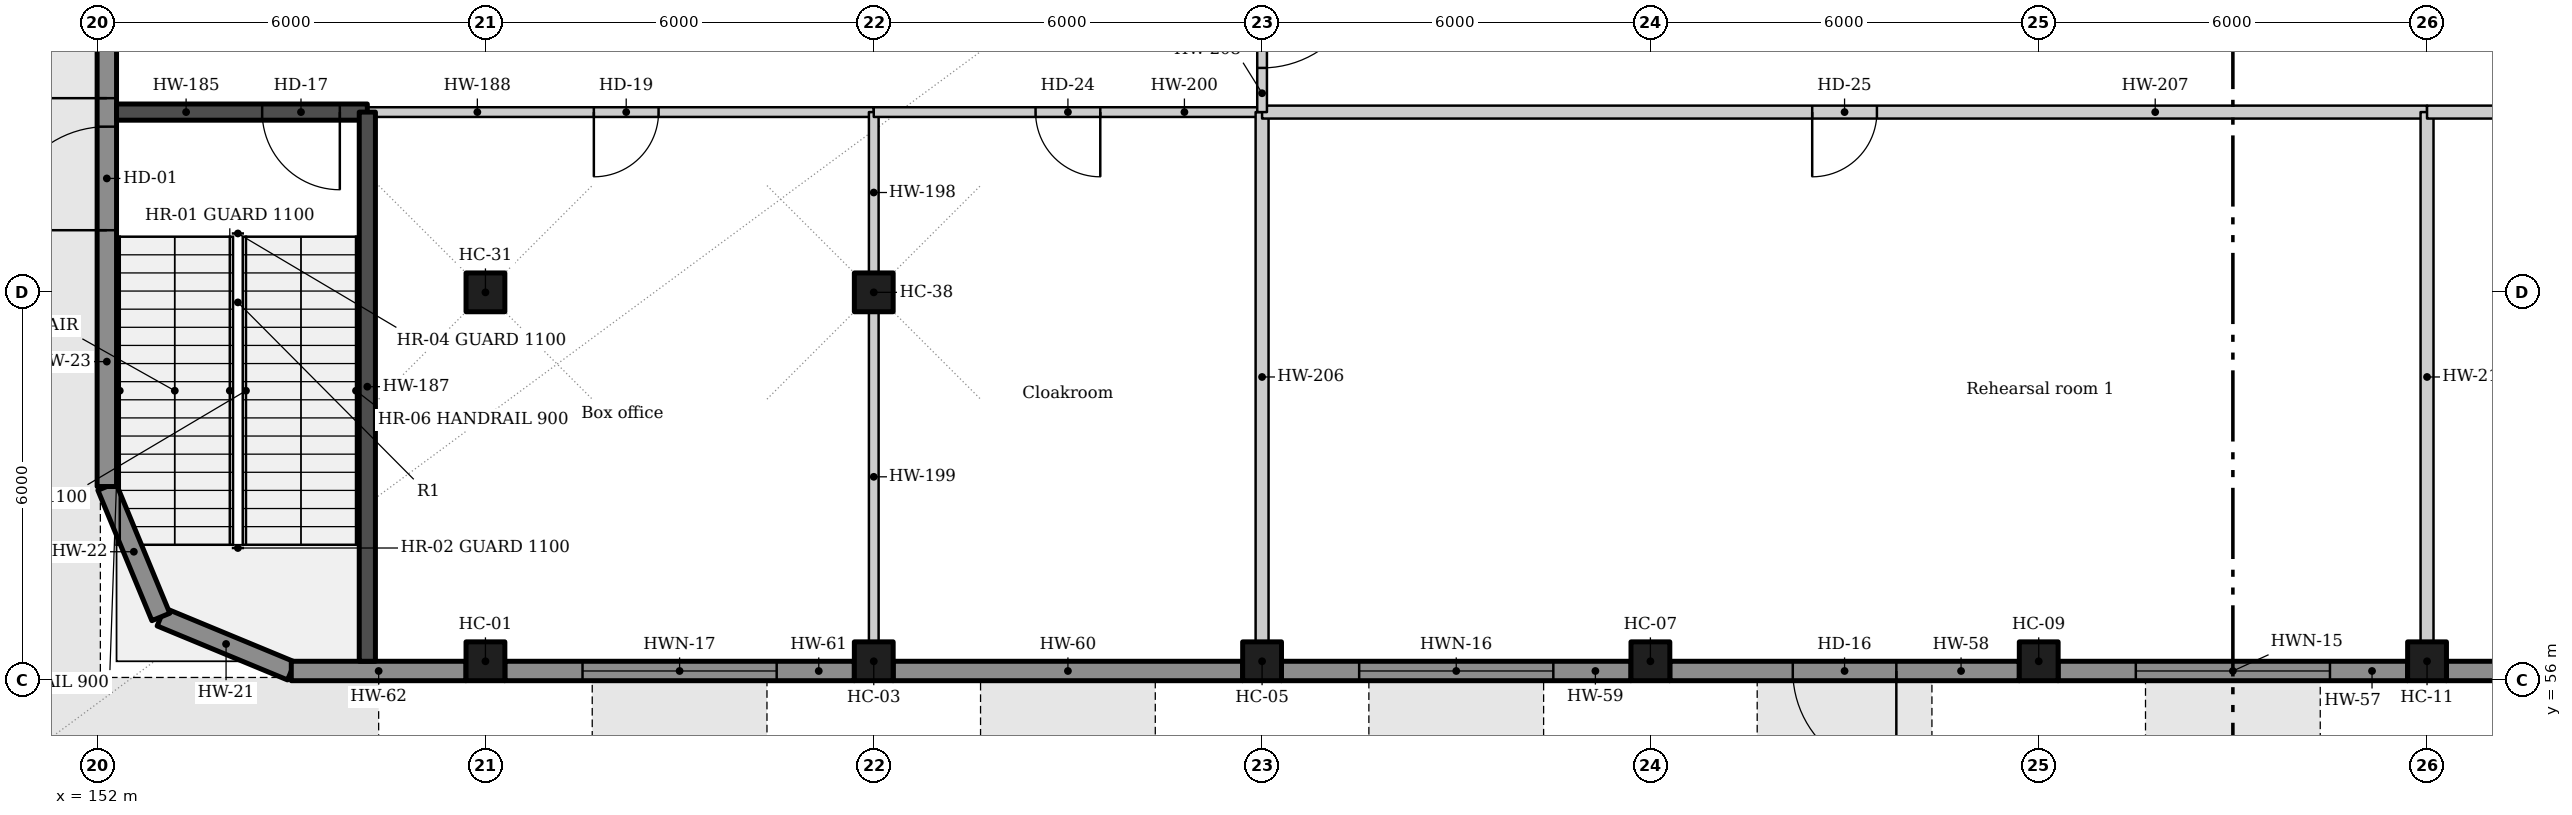
"""IFC4 building model, lengths in metres.
Left out: names, types, materials, properties, quantities, classifications, styles, units other than length and angle.
Written with IfcOpenShell. Run it as: python <this file> out.ifc"""

import sys

from ifc_helpers import new_model, si_unit, direction, frame, frame_2d, origin, origin_2d, place, context, subcontext, project, spatial, rectangle, extrude, element, fill, save


model = new_model("IFC4")
c1 = context("Model", 3, precision=1e-05, world=origin(), true_north=direction((0.0, 1.0)))
c2 = subcontext(c1, "Body", "Model", "MODEL_VIEW")
j1 = project(units=[si_unit("LENGTHUNIT", "METRE"), si_unit("PLANEANGLEUNIT", "RADIAN")], contexts=[c1])
p1 = place(None, origin())
s1 = spatial("IfcSite", under=j1, at=p1, CompositionType="ELEMENT")
p2 = place(p1, origin())
s2 = spatial("IfcBuilding", under=s1, at=p2, CompositionType="ELEMENT")
p3 = place(p2, origin())
s3 = spatial("IfcBuildingStorey", under=s2, at=p3, CompositionType="ELEMENT", Elevation=0.0)
for number, where, z_axis, x_axis in (
    (1, (158.0, 56.3, 0.0), (0.0, 0.0, 1.0), (1.0, 0.0, 0.0)),
    (2, (164.0, 56.3, 0.0), (0.0, 0.0, 1.0), (1.0, 0.0, 0.0)),
    (3, (170.0, 56.3, 0.0), (0.0, 0.0, 1.0), (1.0, 0.0, 0.0)),
    (4, (176.0, 56.3, 0.0), (0.0, 0.0, 1.0), (1.0, 0.0, 0.0)),
    (5, (182.0, 56.3, 0.0), (0.0, 0.0, 1.0), (1.0, 0.0, 0.0)),
    (6, (188.0, 56.3, 0.0), (0.0, 0.0, 1.0), (1.0, 0.0, 0.0)),
    (7, (158.0, 62.0, 0.0), (0.0, 0.0, 1.0), (1.0, 0.0, 0.0)),
    (8, (164.0, 62.0, 0.0), (0.0, 0.0, 1.0), (1.0, 0.0, 0.0)),
):
    element("IfcColumn", number, at=place(p3, frame(where, z_axis=z_axis, x_axis=x_axis)), inside=s3, PredefinedType="COLUMN", context=c2, shape_type="SweptSolid", body=[
        extrude(rectangle(XDim=0.6, YDim=0.6, at=origin_2d()), origin(), (0.0, 0.0, 1.0), 6.6),
    ])
for number, where, z_axis, x_axis in (
    (9, (155.0, 56.15, 0.0), (0.0, 0.0, 1.0), (-0.924, 0.383, 0.0)),
    (10, (152.985, 56.985, 0.0), (0.0, 0.0, 1.0), (-0.383, 0.924, 0.0)),
):
    element("IfcWall", number, at=place(p3, frame(where, z_axis=z_axis, x_axis=x_axis)), inside=s3, PredefinedType="SOLIDWALL", context=c2, shape_type="SweptSolid", body=[
        extrude(rectangle(XDim=2.181, YDim=0.3, at=frame_2d((1.091, 0.0))), origin(), (0.0, 0.0, 1.0), 6.6),
    ])
p4 = place(p3, frame((152.15, 59.0, 0.0), z_axis=(0.0, 0.0, 1.0), x_axis=(0.0, 1.0, 0.0)))
e11 = element("IfcWall", 11, at=p4, inside=s3, PredefinedType="SOLIDWALL", context=c2, shape_type="SweptSolid", body=[
    extrude(rectangle(XDim=8.7, YDim=0.3, at=frame_2d((4.35, 0.0))), origin(), (0.0, 0.0, 1.0), 6.6),
])
p5 = place(p4, frame((3.96, 0.0, 0.0)))
e12 = element("IfcOpeningElement", 12, at=p5, cuts=e11, PredefinedType="OPENING", context=c2, shape_type="SweptSolid", body=[
    extrude(rectangle(XDim=1.6, YDim=2.4, at=frame_2d((0.8, 1.2))), frame((0.0, 0.16, 0.0), z_axis=(0.0, -1.0, 0.0), x_axis=(1.0, 0.0, 0.0)), (0.0, 0.0, 1.0), 0.32),
])
p6 = place(p4, frame((6.0, 0.0, 0.0)))
e13 = element("IfcOpeningElement", 13, at=p6, cuts=e11, PredefinedType="OPENING", context=c2, shape_type="SweptSolid", body=[
    extrude(rectangle(XDim=2.4, YDim=2.5, at=frame_2d((1.2, 1.25))), frame((0.0, 0.16, 0.0), z_axis=(0.0, -1.0, 0.0), x_axis=(1.0, 0.0, 0.0)), (0.0, 0.0, 1.0), 0.32),
])
p7 = place(p3, frame((193.7, 56.15, 0.0), z_axis=(0.0, 0.0, 1.0), x_axis=(-1.0, 0.0, 0.0)))
e14 = element("IfcWall", 14, at=p7, inside=s3, PredefinedType="SOLIDWALL", context=c2, shape_type="SweptSolid", body=[
    extrude(rectangle(XDim=5.4, YDim=0.3, at=frame_2d((2.7, 0.0))), origin(), (0.0, 0.0, 1.0), 6.6),
])
p8 = place(p7, frame((1.2, 0.0, 0.9)))
e15 = element("IfcOpeningElement", 15, at=p8, cuts=e14, PredefinedType="OPENING", context=c2, shape_type="SweptSolid", body=[
    extrude(rectangle(XDim=3.0, YDim=1.8, at=frame_2d((1.5, 0.9))), frame((0.0, 0.16, 0.0), z_axis=(0.0, -1.0, 0.0), x_axis=(1.0, 0.0, 0.0)), (0.0, 0.0, 1.0), 0.32),
])
p9 = place(p3, frame((187.7, 56.15, 0.0), z_axis=(0.0, 0.0, 1.0), x_axis=(-1.0, 0.0, 0.0)))
e16 = element("IfcWall", 16, at=p9, inside=s3, PredefinedType="SOLIDWALL", context=c2, shape_type="SweptSolid", body=[
    extrude(rectangle(XDim=5.4, YDim=0.3, at=frame_2d((2.7, 0.0))), origin(), (0.0, 0.0, 1.0), 6.6),
])
p10 = place(p9, frame((1.2, 0.0, 0.9)))
e17 = element("IfcOpeningElement", 17, at=p10, cuts=e16, PredefinedType="OPENING", context=c2, shape_type="SweptSolid", body=[
    extrude(rectangle(XDim=3.0, YDim=1.8, at=frame_2d((1.5, 0.9))), frame((0.0, 0.16, 0.0), z_axis=(0.0, -1.0, 0.0), x_axis=(1.0, 0.0, 0.0)), (0.0, 0.0, 1.0), 0.32),
])
p11 = place(p3, frame((181.7, 56.15, 0.0), z_axis=(0.0, 0.0, 1.0), x_axis=(-1.0, 0.0, 0.0)))
e18 = element("IfcWall", 18, at=p11, inside=s3, PredefinedType="SOLIDWALL", context=c2, shape_type="SweptSolid", body=[
    extrude(rectangle(XDim=5.4, YDim=0.3, at=frame_2d((2.7, 0.0))), origin(), (0.0, 0.0, 1.0), 6.6),
])
p12 = place(p11, frame((1.9, 0.0, 0.0)))
e19 = element("IfcOpeningElement", 19, at=p12, cuts=e18, PredefinedType="OPENING", context=c2, shape_type="SweptSolid", body=[
    extrude(rectangle(XDim=1.6, YDim=2.4, at=frame_2d((0.8, 1.2))), frame((0.0, 0.16, 0.0), z_axis=(0.0, -1.0, 0.0), x_axis=(1.0, 0.0, 0.0)), (0.0, 0.0, 1.0), 0.32),
])
p13 = place(p3, frame((175.7, 56.15, 0.0), z_axis=(0.0, 0.0, 1.0), x_axis=(-1.0, 0.0, 0.0)))
e20 = element("IfcWall", 20, at=p13, inside=s3, PredefinedType="SOLIDWALL", context=c2, shape_type="SweptSolid", body=[
    extrude(rectangle(XDim=5.4, YDim=0.3, at=frame_2d((2.7, 0.0))), origin(), (0.0, 0.0, 1.0), 6.6),
])
p14 = place(p13, frame((1.2, 0.0, 0.9)))
e21 = element("IfcOpeningElement", 21, at=p14, cuts=e20, PredefinedType="OPENING", context=c2, shape_type="SweptSolid", body=[
    extrude(rectangle(XDim=3.0, YDim=1.8, at=frame_2d((1.5, 0.9))), frame((0.0, 0.16, 0.0), z_axis=(0.0, -1.0, 0.0), x_axis=(1.0, 0.0, 0.0)), (0.0, 0.0, 1.0), 0.32),
])
p15 = place(p3, frame((169.7, 56.15, 0.0), z_axis=(0.0, 0.0, 1.0), x_axis=(-1.0, 0.0, 0.0)))
e22 = element("IfcWall", 22, at=p15, inside=s3, PredefinedType="SOLIDWALL", context=c2, shape_type="SweptSolid", body=[
    extrude(rectangle(XDim=5.4, YDim=0.3, at=frame_2d((2.7, 0.0))), origin(), (0.0, 0.0, 1.0), 6.6),
])
p16 = place(p3, frame((163.7, 56.15, 0.0), z_axis=(0.0, 0.0, 1.0), x_axis=(-1.0, 0.0, 0.0)))
e23 = element("IfcWall", 23, at=p16, inside=s3, PredefinedType="SOLIDWALL", context=c2, shape_type="SweptSolid", body=[
    extrude(rectangle(XDim=5.4, YDim=0.3, at=frame_2d((2.7, 0.0))), origin(), (0.0, 0.0, 1.0), 6.6),
])
p17 = place(p16, frame((1.2, 0.0, 0.9)))
e24 = element("IfcOpeningElement", 24, at=p17, cuts=e23, PredefinedType="OPENING", context=c2, shape_type="SweptSolid", body=[
    extrude(rectangle(XDim=3.0, YDim=1.8, at=frame_2d((1.5, 0.9))), frame((0.0, 0.16, 0.0), z_axis=(0.0, -1.0, 0.0), x_axis=(1.0, 0.0, 0.0)), (0.0, 0.0, 1.0), 0.32),
])
p18 = place(p3, frame((157.7, 56.15, 0.0), z_axis=(0.0, 0.0, 1.0), x_axis=(-1.0, 0.0, 0.0)))
e25 = element("IfcWall", 25, at=p18, inside=s3, PredefinedType="SOLIDWALL", context=c2, shape_type="SweptSolid", body=[
    extrude(rectangle(XDim=2.7, YDim=0.3, at=frame_2d((1.35, 0.0))), origin(), (0.0, 0.0, 1.0), 6.6),
])
p19 = place(p3, frame((156.175, 64.785, 0.0), z_axis=(0.0, 0.0, 1.0), x_axis=(-1.0, 0.0, 0.0)))
e26 = element("IfcWall", 26, at=p19, inside=s3, PredefinedType="SOLIDWALL", context=c2, shape_type="SweptSolid", body=[
    extrude(rectangle(XDim=3.875, YDim=0.25, at=frame_2d((1.938, 0.0))), origin(), (0.0, 0.0, 1.0), 6.6),
])
p20 = place(p19, frame((0.425, 0.0, 0.0)))
e27 = element("IfcOpeningElement", 27, at=p20, cuts=e26, PredefinedType="OPENING", context=c2, shape_type="SweptSolid", body=[
    extrude(rectangle(XDim=1.2, YDim=2.1, at=frame_2d((0.6, 1.05))), frame((0.0, 0.135, 0.0), z_axis=(0.0, -1.0, 0.0), x_axis=(1.0, 0.0, 0.0)), (0.0, 0.0, 1.0), 0.27),
])
p21 = place(p3, frame((156.175, 64.785, 0.0), z_axis=(0.0, 0.0, 1.0), x_axis=(0.0, -1.0, 0.0)))
e28 = element("IfcWall", 28, at=p21, inside=s3, PredefinedType="SOLIDWALL", context=c2, shape_type="SweptSolid", body=[
    extrude(rectangle(XDim=8.485, YDim=0.25, at=frame_2d((4.242, 0.0))), origin(), (0.0, 0.0, 1.0), 6.6),
])
p22 = place(p3, frame((164.0, 64.785, 0.0), z_axis=(0.0, 0.0, 1.0), x_axis=(-1.0, 0.0, 0.0)))
e29 = element("IfcWall", 29, at=p22, inside=s3, PredefinedType="PARTITIONING", context=c2, shape_type="SweptSolid", body=[
    extrude(rectangle(XDim=7.825, YDim=0.15, at=frame_2d((3.913, 0.0))), origin(), (0.0, 0.0, 1.0), 6.25),
])
p23 = place(p22, frame((3.325, 0.0, 0.0)))
e30 = element("IfcOpeningElement", 30, at=p23, cuts=e29, PredefinedType="OPENING", context=c2, shape_type="SweptSolid", body=[
    extrude(rectangle(XDim=1.0, YDim=2.1, at=frame_2d((0.5, 1.05))), frame((0.0, 0.085, 0.0), z_axis=(0.0, -1.0, 0.0), x_axis=(1.0, 0.0, 0.0)), (0.0, 0.0, 1.0), 0.17),
])
p24 = place(p3, frame((164.0, 64.785, 0.0), z_axis=(0.0, 0.0, 1.0), x_axis=(0.0, -1.0, 0.0)))
e31 = element("IfcWall", 31, at=p24, inside=s3, PredefinedType="PARTITIONING", context=c2, shape_type="SweptSolid", body=[
    extrude(rectangle(XDim=2.485, YDim=0.15, at=frame_2d((1.242, 0.0))), origin(), (0.0, 0.0, 1.0), 6.25),
])
p25 = place(p3, frame((164.0, 61.7, 0.0), z_axis=(0.0, 0.0, 1.0), x_axis=(0.0, -1.0, 0.0)))
e32 = element("IfcWall", 32, at=p25, inside=s3, PredefinedType="PARTITIONING", context=c2, shape_type="SweptSolid", body=[
    extrude(rectangle(XDim=5.1, YDim=0.15, at=frame_2d((2.55, 0.0))), origin(), (0.0, 0.0, 1.0), 6.25),
])
p26 = place(p3, frame((170.0, 64.785, 0.0), z_axis=(0.0, 0.0, 1.0), x_axis=(-1.0, 0.0, 0.0)))
e33 = element("IfcWall", 33, at=p26, inside=s3, PredefinedType="PARTITIONING", context=c2, shape_type="SweptSolid", body=[
    extrude(rectangle(XDim=6.0, YDim=0.15, at=frame_2d((3.0, 0.0))), origin(), (0.0, 0.0, 1.0), 6.25),
])
p27 = place(p26, frame((2.5, 0.0, 0.0)))
e34 = element("IfcOpeningElement", 34, at=p27, cuts=e33, PredefinedType="OPENING", context=c2, shape_type="SweptSolid", body=[
    extrude(rectangle(XDim=1.0, YDim=2.1, at=frame_2d((0.5, 1.05))), frame((0.0, 0.085, 0.0), z_axis=(0.0, -1.0, 0.0), x_axis=(1.0, 0.0, 0.0)), (0.0, 0.0, 1.0), 0.17),
])
p28 = place(p3, frame((170.0, 64.785, 0.0), z_axis=(0.0, 0.0, 1.0), x_axis=(0.0, -1.0, 0.0)))
e35 = element("IfcWall", 35, at=p28, inside=s3, PredefinedType="PARTITIONING", context=c2, shape_type="SweptSolid", body=[
    extrude(rectangle(XDim=8.185, YDim=0.2, at=frame_2d((4.092, 0.0))), origin(), (0.0, 0.0, 1.0), 6.25),
])
p29 = place(p3, frame((188.0, 64.785, 0.0), z_axis=(0.0, 0.0, 1.0), x_axis=(-1.0, 0.0, 0.0)))
e36 = element("IfcWall", 36, at=p29, inside=s3, PredefinedType="PARTITIONING", context=c2, shape_type="SweptSolid", body=[
    extrude(rectangle(XDim=18.0, YDim=0.2, at=frame_2d((9.0, 0.0))), origin(), (0.0, 0.0, 1.0), 6.25),
])
p30 = place(p29, frame((8.5, 0.0, 0.0)))
e37 = element("IfcOpeningElement", 37, at=p30, cuts=e36, PredefinedType="OPENING", context=c2, shape_type="SweptSolid", body=[
    extrude(rectangle(XDim=1.0, YDim=2.1, at=frame_2d((0.5, 1.05))), frame((0.0, 0.11, 0.0), z_axis=(0.0, -1.0, 0.0), x_axis=(1.0, 0.0, 0.0)), (0.0, 0.0, 1.0), 0.22),
])
p31 = place(p3, frame((170.0, 67.75, 0.0), z_axis=(0.0, 0.0, 1.0), x_axis=(0.0, -1.0, 0.0)))
e38 = element("IfcWall", 38, at=p31, inside=s3, PredefinedType="PARTITIONING", context=c2, shape_type="SweptSolid", body=[
    extrude(rectangle(XDim=2.965, YDim=0.15, at=frame_2d((1.482, 0.0))), origin(), (0.0, 0.0, 1.0), 6.25),
])
p32 = place(p31, frame((0.683, 0.0, 0.0)))
e39 = element("IfcOpeningElement", 39, at=p32, cuts=e38, PredefinedType="OPENING", context=c2, shape_type="SweptSolid", body=[
    extrude(rectangle(XDim=1.6, YDim=2.1, at=frame_2d((0.8, 1.05))), frame((0.0, 0.085, 0.0), z_axis=(0.0, -1.0, 0.0), x_axis=(1.0, 0.0, 0.0)), (0.0, 0.0, 1.0), 0.17),
])
p33 = place(p3, frame((188.0, 64.785, 0.0), z_axis=(0.0, 0.0, 1.0), x_axis=(0.0, -1.0, 0.0)))
e40 = element("IfcWall", 40, at=p33, inside=s3, PredefinedType="PARTITIONING", context=c2, shape_type="SweptSolid", body=[
    extrude(rectangle(XDim=8.185, YDim=0.2, at=frame_2d((4.092, 0.0))), origin(), (0.0, 0.0, 1.0), 6.25),
])
p34 = place(p3, frame((206.0, 64.785, 0.0), z_axis=(0.0, 0.0, 1.0), x_axis=(-1.0, 0.0, 0.0)))
e41 = element("IfcWall", 41, at=p34, inside=s3, PredefinedType="PARTITIONING", context=c2, shape_type="SweptSolid", body=[
    extrude(rectangle(XDim=18.0, YDim=0.2, at=frame_2d((9.0, 0.0))), origin(), (0.0, 0.0, 1.0), 6.25),
])
p35 = place(p34, frame((8.5, 0.0, 0.0)))
e42 = element("IfcOpeningElement", 42, at=p35, cuts=e41, PredefinedType="OPENING", context=c2, shape_type="SweptSolid", body=[
    extrude(rectangle(XDim=1.0, YDim=2.1, at=frame_2d((0.5, 1.05))), frame((0.0, 0.11, 0.0), z_axis=(0.0, -1.0, 0.0), x_axis=(1.0, 0.0, 0.0)), (0.0, 0.0, 1.0), 0.22),
])
p36 = place(p5, origin())
e43 = element("IfcDoor", 43, at=p36, inside=s3, OperationType="SINGLE_SWING_LEFT", PredefinedType="DOOR", context=c2, shape_type="SweptSolid", body=[
    extrude(rectangle(XDim=1.6, YDim=2.4, at=frame_2d((0.8, 1.2))), frame((0.0, 0.025, 0.0), z_axis=(0.0, -1.0, 0.0), x_axis=(1.0, 0.0, 0.0)), (0.0, 0.0, 1.0), 0.05),
])
fill(e12, e43)
p37 = place(p6, origin())
e44 = element("IfcDoor", 44, at=p37, inside=s3, OperationType="SINGLE_SWING_LEFT", PredefinedType="DOOR", context=c2, shape_type="SweptSolid", body=[
    extrude(rectangle(XDim=2.4, YDim=2.5, at=frame_2d((1.2, 1.25))), frame((0.0, 0.025, 0.0), z_axis=(0.0, -1.0, 0.0), x_axis=(1.0, 0.0, 0.0)), (0.0, 0.0, 1.0), 0.05),
])
fill(e13, e44)
p38 = place(p10, origin())
e45 = element("IfcWindow", 45, at=p38, inside=s3, PartitioningType="SINGLE_PANEL", PredefinedType="WINDOW", context=c2, shape_type="SweptSolid", body=[
    extrude(rectangle(XDim=3.0, YDim=1.8, at=frame_2d((1.5, 0.9))), frame((0.0, 0.03, 0.0), z_axis=(0.0, -1.0, 0.0), x_axis=(1.0, 0.0, 0.0)), (0.0, 0.0, 1.0), 0.06),
])
fill(e17, e45)
p39 = place(p12, origin())
e46 = element("IfcDoor", 46, at=p39, inside=s3, OperationType="SINGLE_SWING_LEFT", PredefinedType="DOOR", context=c2, shape_type="SweptSolid", body=[
    extrude(rectangle(XDim=1.6, YDim=2.4, at=frame_2d((0.8, 1.2))), frame((0.0, 0.025, 0.0), z_axis=(0.0, -1.0, 0.0), x_axis=(1.0, 0.0, 0.0)), (0.0, 0.0, 1.0), 0.05),
])
fill(e19, e46)
p40 = place(p14, origin())
e47 = element("IfcWindow", 47, at=p40, inside=s3, PartitioningType="SINGLE_PANEL", PredefinedType="WINDOW", context=c2, shape_type="SweptSolid", body=[
    extrude(rectangle(XDim=3.0, YDim=1.8, at=frame_2d((1.5, 0.9))), frame((0.0, 0.03, 0.0), z_axis=(0.0, -1.0, 0.0), x_axis=(1.0, 0.0, 0.0)), (0.0, 0.0, 1.0), 0.06),
])
fill(e21, e47)
p41 = place(p17, origin())
e48 = element("IfcWindow", 48, at=p41, inside=s3, PartitioningType="SINGLE_PANEL", PredefinedType="WINDOW", context=c2, shape_type="SweptSolid", body=[
    extrude(rectangle(XDim=3.0, YDim=1.8, at=frame_2d((1.5, 0.9))), frame((0.0, 0.03, 0.0), z_axis=(0.0, -1.0, 0.0), x_axis=(1.0, 0.0, 0.0)), (0.0, 0.0, 1.0), 0.06),
])
fill(e24, e48)
p42 = place(p20, origin())
e49 = element("IfcDoor", 49, at=p42, inside=s3, OperationType="SINGLE_SWING_LEFT", PredefinedType="DOOR", context=c2, shape_type="SweptSolid", body=[
    extrude(rectangle(XDim=1.2, YDim=2.1, at=frame_2d((0.6, 1.05))), frame((0.0, 0.025, 0.0), z_axis=(0.0, -1.0, 0.0), x_axis=(1.0, 0.0, 0.0)), (0.0, 0.0, 1.0), 0.05),
])
fill(e27, e49)
p43 = place(p23, origin())
e50 = element("IfcDoor", 50, at=p43, inside=s3, OperationType="SINGLE_SWING_RIGHT", PredefinedType="DOOR", context=c2, shape_type="SweptSolid", body=[
    extrude(rectangle(XDim=1.0, YDim=2.1, at=frame_2d((0.5, 1.05))), frame((0.0, 0.025, 0.0), z_axis=(0.0, -1.0, 0.0), x_axis=(1.0, 0.0, 0.0)), (0.0, 0.0, 1.0), 0.05),
])
fill(e30, e50)
p44 = place(p27, origin())
e51 = element("IfcDoor", 51, at=p44, inside=s3, OperationType="SINGLE_SWING_LEFT", PredefinedType="DOOR", context=c2, shape_type="SweptSolid", body=[
    extrude(rectangle(XDim=1.0, YDim=2.1, at=frame_2d((0.5, 1.05))), frame((0.0, 0.025, 0.0), z_axis=(0.0, -1.0, 0.0), x_axis=(1.0, 0.0, 0.0)), (0.0, 0.0, 1.0), 0.05),
])
fill(e34, e51)
p45 = place(p30, origin())
e52 = element("IfcDoor", 52, at=p45, inside=s3, OperationType="SINGLE_SWING_RIGHT", PredefinedType="DOOR", context=c2, shape_type="SweptSolid", body=[
    extrude(rectangle(XDim=1.0, YDim=2.1, at=frame_2d((0.5, 1.05))), frame((0.0, 0.025, 0.0), z_axis=(0.0, -1.0, 0.0), x_axis=(1.0, 0.0, 0.0)), (0.0, 0.0, 1.0), 0.05),
])
fill(e37, e52)
p46 = place(p32, origin())
e53 = element("IfcDoor", 53, at=p46, inside=s3, OperationType="DOUBLE_DOOR_SINGLE_SWING", PredefinedType="DOOR", context=c2, shape_type="SweptSolid", body=[
    extrude(rectangle(XDim=1.6, YDim=2.1, at=frame_2d((0.8, 1.05))), frame((0.0, 0.025, 0.0), z_axis=(0.0, -1.0, 0.0), x_axis=(1.0, 0.0, 0.0)), (0.0, 0.0, 1.0), 0.05),
])
fill(e39, e53)
save(model, sys.argv[1])
